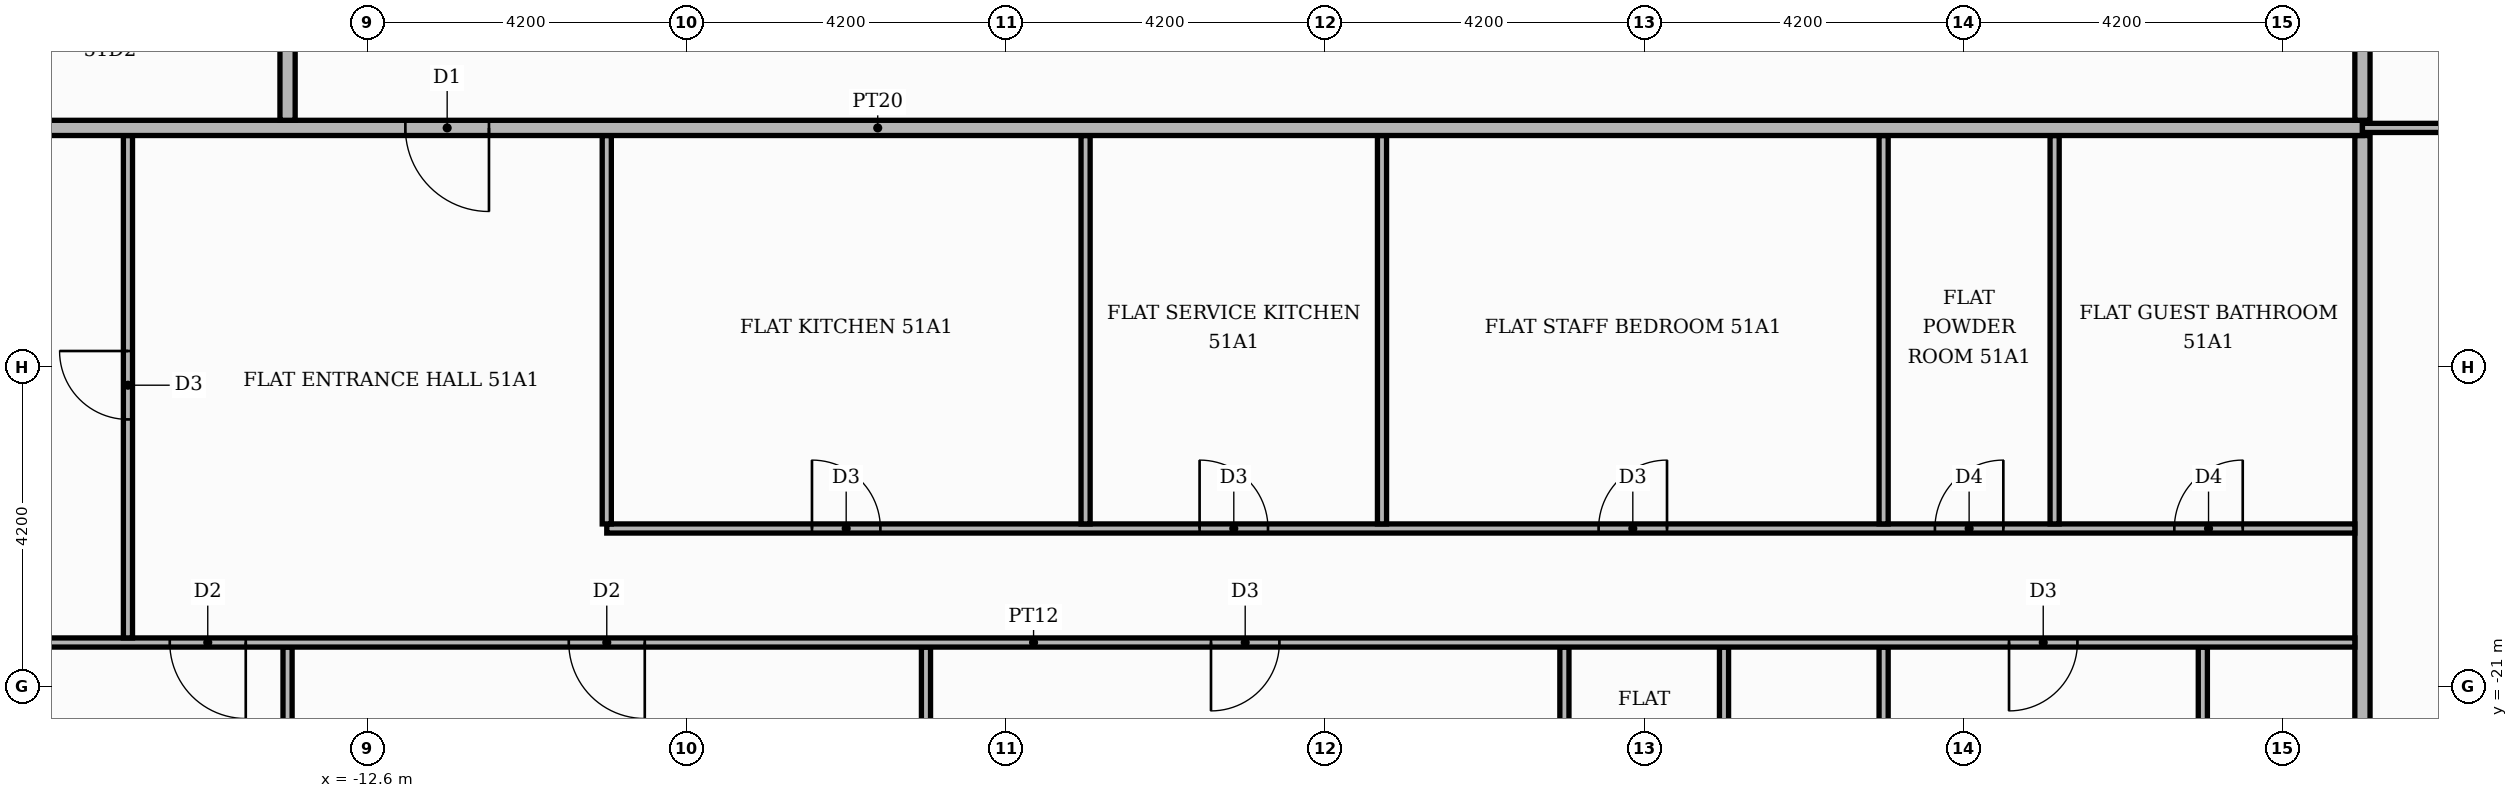
"""IFC4 building model, lengths in metres.
Left out: names, types, materials, properties, quantities, classifications, styles, units other than length and angle.
Written with IfcOpenShell. Run it as: python <this file> out.ifc"""

import sys

from ifc_helpers import new_model, si_unit, direction, frame, frame_2d, origin, place, context, subcontext, project, spatial, rectangle, extrude, element, fill, save


model = new_model("IFC4")
c1 = context("Model", 3, precision=1e-05, world=origin(), true_north=direction((0.0, 1.0)))
c2 = subcontext(c1, "Body", "Model", "MODEL_VIEW")
j1 = project(units=[si_unit("LENGTHUNIT", "METRE"), si_unit("PLANEANGLEUNIT", "RADIAN")], contexts=[c1])
p1 = place(None, origin())
s1 = spatial("IfcSite", under=j1, at=p1, CompositionType="ELEMENT")
p2 = place(p1, origin())
s2 = spatial("IfcBuilding", under=s1, at=p2, CompositionType="ELEMENT")
p3 = place(p2, frame((0.0, 0.0, 215.7)))
s3 = spatial("IfcBuildingStorey", under=s2, at=p3, CompositionType="ELEMENT", Elevation=215.7)
for number, where, z_axis, x_axis in (
    (1, (-13.65, -25.42, 0.0), (0.0, 0.0, 1.0), (0.0, 1.0, 0.0)),
    (2, (-5.25, -25.42, 0.0), (0.0, 0.0, 1.0), (0.0, 1.0, 0.0)),
):
    element("IfcWall", number, at=place(p3, frame(where, z_axis=z_axis, x_axis=x_axis)), inside=s3, PredefinedType="PARTITIONING", context=c2, shape_type="SweptSolid", body=[
        extrude(rectangle(XDim=4.94, YDim=0.12, at=frame_2d((2.47, 0.0))), origin(), (0.0, 0.0, 1.0), 3.48),
    ])
p4 = place(p3, frame((3.15, -25.42, 0.0), z_axis=(0.0, 0.0, 1.0), x_axis=(0.0, 1.0, 0.0)))
e3 = element("IfcWall", 3, at=p4, inside=s3, PredefinedType="PARTITIONING", context=c2, shape_type="SweptSolid", body=[
    extrude(rectangle(XDim=4.94, YDim=0.12, at=frame_2d((2.47, 0.0))), origin(), (0.0, 0.0, 1.0), 3.48),
])
p5 = place(p4, frame((1.9, 0.0, 0.0)))
e4 = element("IfcOpeningElement", 4, at=p5, cuts=e3, PredefinedType="OPENING", context=c2, shape_type="SweptSolid", body=[
    extrude(rectangle(XDim=0.9, YDim=2.1, at=frame_2d((0.45, 1.05))), frame((0.0, 0.07, 0.0), z_axis=(0.0, -1.0, 0.0), x_axis=(1.0, 0.0, 0.0)), (0.0, 0.0, 1.0), 0.14),
])
p6 = place(p3, frame((5.25, -25.42, 0.0), z_axis=(0.0, 0.0, 1.0), x_axis=(0.0, 1.0, 0.0)))
e5 = element("IfcWall", 5, at=p6, inside=s3, PredefinedType="PARTITIONING", context=c2, shape_type="SweptSolid", body=[
    extrude(rectangle(XDim=4.94, YDim=0.12, at=frame_2d((2.47, 0.0))), origin(), (0.0, 0.0, 1.0), 3.48),
])
p7 = place(p6, frame((1.9, 0.0, 0.0)))
e6 = element("IfcOpeningElement", 6, at=p7, cuts=e5, PredefinedType="OPENING", context=c2, shape_type="SweptSolid", body=[
    extrude(rectangle(XDim=0.9, YDim=2.1, at=frame_2d((0.45, 1.05))), frame((0.0, 0.07, 0.0), z_axis=(0.0, -1.0, 0.0), x_axis=(1.0, 0.0, 0.0)), (0.0, 0.0, 1.0), 0.14),
])
p8 = place(p3, frame((7.35, -25.42, 0.0), z_axis=(0.0, 0.0, 1.0), x_axis=(0.0, 1.0, 0.0)))
e7 = element("IfcWall", 7, at=p8, inside=s3, PredefinedType="PARTITIONING", context=c2, shape_type="SweptSolid", body=[
    extrude(rectangle(XDim=4.94, YDim=0.12, at=frame_2d((2.47, 0.0))), origin(), (0.0, 0.0, 1.0), 3.48),
])
p9 = place(p3, frame((11.55, -25.42, 0.0), z_axis=(0.0, 0.0, 1.0), x_axis=(0.0, 1.0, 0.0)))
e8 = element("IfcWall", 8, at=p9, inside=s3, PredefinedType="PARTITIONING", context=c2, shape_type="SweptSolid", body=[
    extrude(rectangle(XDim=4.94, YDim=0.12, at=frame_2d((2.47, 0.0))), origin(), (0.0, 0.0, 1.0), 3.48),
])
p10 = place(p9, frame((1.9, 0.0, 0.0)))
e9 = element("IfcOpeningElement", 9, at=p10, cuts=e8, PredefinedType="OPENING", context=c2, shape_type="SweptSolid", body=[
    extrude(rectangle(XDim=0.9, YDim=2.1, at=frame_2d((0.45, 1.05))), frame((0.0, 0.07, 0.0), z_axis=(0.0, -1.0, 0.0), x_axis=(1.0, 0.0, 0.0)), (0.0, 0.0, 1.0), 0.14),
])
p11 = place(p3, frame((13.65, -25.42, 0.0), z_axis=(0.0, 0.0, 1.0), x_axis=(0.0, 1.0, 0.0)))
e10 = element("IfcWall", 10, at=p11, inside=s3, PredefinedType="PARTITIONING", context=c2, shape_type="SweptSolid", body=[
    extrude(rectangle(XDim=11.67, YDim=0.2, at=frame_2d((5.835, 0.0))), origin(), (0.0, 0.0, 1.0), 3.48),
])
p12 = place(p3, frame((-21.219, -20.42, 0.0), z_axis=(0.0, 0.0, 1.0), x_axis=(1.0, 0.0, 0.0)))
e11 = element("IfcWall", 11, at=p12, inside=s3, PredefinedType="PARTITIONING", context=c2, shape_type="SweptSolid", body=[
    extrude(rectangle(XDim=34.769, YDim=0.12, at=frame_2d((17.385, 0.0))), origin(), (0.0, 0.0, 1.0), 3.48),
])
p13 = place(p12, frame((6.019, 0.0, 0.0)))
e12 = element("IfcOpeningElement", 12, at=p13, cuts=e11, PredefinedType="OPENING", context=c2, shape_type="SweptSolid", body=[
    extrude(rectangle(XDim=1.0, YDim=2.1, at=frame_2d((0.5, 1.05))), frame((0.0, 0.07, 0.0), z_axis=(0.0, -1.0, 0.0), x_axis=(1.0, 0.0, 0.0)), (0.0, 0.0, 1.0), 0.14),
])
p14 = place(p12, frame((11.269, 0.0, 0.0)))
e13 = element("IfcOpeningElement", 13, at=p14, cuts=e11, PredefinedType="OPENING", context=c2, shape_type="SweptSolid", body=[
    extrude(rectangle(XDim=1.0, YDim=2.1, at=frame_2d((0.5, 1.05))), frame((0.0, 0.07, 0.0), z_axis=(0.0, -1.0, 0.0), x_axis=(1.0, 0.0, 0.0)), (0.0, 0.0, 1.0), 0.14),
])
p15 = place(p12, frame((19.719, 0.0, 0.0)))
e14 = element("IfcOpeningElement", 14, at=p15, cuts=e11, PredefinedType="OPENING", context=c2, shape_type="SweptSolid", body=[
    extrude(rectangle(XDim=0.9, YDim=2.1, at=frame_2d((0.45, 1.05))), frame((0.0, 0.07, 0.0), z_axis=(0.0, -1.0, 0.0), x_axis=(1.0, 0.0, 0.0)), (0.0, 0.0, 1.0), 0.14),
])
p16 = place(p12, frame((30.219, 0.0, 0.0)))
e15 = element("IfcOpeningElement", 15, at=p16, cuts=e11, PredefinedType="OPENING", context=c2, shape_type="SweptSolid", body=[
    extrude(rectangle(XDim=0.9, YDim=2.1, at=frame_2d((0.45, 1.05))), frame((0.0, 0.07, 0.0), z_axis=(0.0, -1.0, 0.0), x_axis=(1.0, 0.0, 0.0)), (0.0, 0.0, 1.0), 0.14),
])
p17 = place(p3, frame((-15.75, -20.36, 0.0), z_axis=(0.0, 0.0, 1.0), x_axis=(0.0, 1.0, 0.0)))
e16 = element("IfcWall", 16, at=p17, inside=s3, PredefinedType="PARTITIONING", context=c2, shape_type="SweptSolid", body=[
    extrude(rectangle(XDim=6.61, YDim=0.12, at=frame_2d((3.305, 0.0))), origin(), (0.0, 0.0, 1.0), 3.48),
])
p18 = place(p17, frame((2.875, 0.0, 0.0)))
e17 = element("IfcOpeningElement", 17, at=p18, cuts=e16, PredefinedType="OPENING", context=c2, shape_type="SweptSolid", body=[
    extrude(rectangle(XDim=0.9, YDim=2.1, at=frame_2d((0.45, 1.05))), frame((0.0, 0.07, 0.0), z_axis=(0.0, -1.0, 0.0), x_axis=(1.0, 0.0, 0.0)), (0.0, 0.0, 1.0), 0.14),
])
p19 = place(p3, frame((-9.45, -18.92, 0.0), z_axis=(0.0, 0.0, 1.0), x_axis=(1.0, 0.0, 0.0)))
e18 = element("IfcWall", 18, at=p19, inside=s3, PredefinedType="PARTITIONING", context=c2, shape_type="SweptSolid", body=[
    extrude(rectangle(XDim=23.0, YDim=0.12, at=frame_2d((11.5, 0.0))), origin(), (0.0, 0.0, 1.0), 3.48),
])
p20 = place(p19, frame((2.7, 0.0, 0.0)))
e19 = element("IfcOpeningElement", 19, at=p20, cuts=e18, PredefinedType="OPENING", context=c2, shape_type="SweptSolid", body=[
    extrude(rectangle(XDim=0.9, YDim=2.1, at=frame_2d((0.45, 1.05))), frame((0.0, 0.07, 0.0), z_axis=(0.0, -1.0, 0.0), x_axis=(1.0, 0.0, 0.0)), (0.0, 0.0, 1.0), 0.14),
])
p21 = place(p19, frame((7.8, 0.0, 0.0)))
e20 = element("IfcOpeningElement", 20, at=p21, cuts=e18, PredefinedType="OPENING", context=c2, shape_type="SweptSolid", body=[
    extrude(rectangle(XDim=0.9, YDim=2.1, at=frame_2d((0.45, 1.05))), frame((0.0, 0.07, 0.0), z_axis=(0.0, -1.0, 0.0), x_axis=(1.0, 0.0, 0.0)), (0.0, 0.0, 1.0), 0.14),
])
p22 = place(p19, frame((13.05, 0.0, 0.0)))
e21 = element("IfcOpeningElement", 21, at=p22, cuts=e18, PredefinedType="OPENING", context=c2, shape_type="SweptSolid", body=[
    extrude(rectangle(XDim=0.9, YDim=2.1, at=frame_2d((0.45, 1.05))), frame((0.0, 0.07, 0.0), z_axis=(0.0, -1.0, 0.0), x_axis=(1.0, 0.0, 0.0)), (0.0, 0.0, 1.0), 0.14),
])
p23 = place(p19, frame((17.475, 0.0, 0.0)))
e22 = element("IfcOpeningElement", 22, at=p23, cuts=e18, PredefinedType="OPENING", context=c2, shape_type="SweptSolid", body=[
    extrude(rectangle(XDim=0.9, YDim=2.1, at=frame_2d((0.45, 1.05))), frame((0.0, 0.07, 0.0), z_axis=(0.0, -1.0, 0.0), x_axis=(1.0, 0.0, 0.0)), (0.0, 0.0, 1.0), 0.14),
])
p24 = place(p19, frame((20.625, 0.0, 0.0)))
e23 = element("IfcOpeningElement", 23, at=p24, cuts=e18, PredefinedType="OPENING", context=c2, shape_type="SweptSolid", body=[
    extrude(rectangle(XDim=0.9, YDim=2.1, at=frame_2d((0.45, 1.05))), frame((0.0, 0.07, 0.0), z_axis=(0.0, -1.0, 0.0), x_axis=(1.0, 0.0, 0.0)), (0.0, 0.0, 1.0), 0.14),
])
for number, where, z_axis, x_axis in (
    (24, (-9.45, -18.86, 0.0), (0.0, 0.0, 1.0), (0.0, 1.0, 0.0)),
    (25, (-3.15, -18.86, 0.0), (0.0, 0.0, 1.0), (0.0, 1.0, 0.0)),
    (26, (0.75, -18.86, 0.0), (0.0, 0.0, 1.0), (0.0, 1.0, 0.0)),
    (27, (7.35, -18.86, 0.0), (0.0, 0.0, 1.0), (0.0, 1.0, 0.0)),
    (28, (9.6, -18.86, 0.0), (0.0, 0.0, 1.0), (0.0, 1.0, 0.0)),
):
    element("IfcWall", number, at=place(p3, frame(where, z_axis=z_axis, x_axis=x_axis)), inside=s3, PredefinedType="PARTITIONING", context=c2, shape_type="SweptSolid", body=[
        extrude(rectangle(XDim=5.11, YDim=0.12, at=frame_2d((2.555, 0.0))), origin(), (0.0, 0.0, 1.0), 3.48),
    ])
p25 = place(p3, frame((-25.42, -13.65, 0.0), z_axis=(0.0, 0.0, 1.0), x_axis=(1.0, 0.0, 0.0)))
e29 = element("IfcWall", 29, at=p25, inside=s3, PredefinedType="PARTITIONING", context=c2, shape_type="SweptSolid", body=[
    extrude(rectangle(XDim=39.07, YDim=0.2, at=frame_2d((19.535, 0.0))), origin(), (0.0, 0.0, 1.0), 3.48),
])
p26 = place(p25, frame((13.32, 0.0, 0.0)))
e30 = element("IfcOpeningElement", 30, at=p26, cuts=e29, PredefinedType="OPENING", context=c2, shape_type="SweptSolid", body=[
    extrude(rectangle(XDim=1.1, YDim=2.4, at=frame_2d((0.55, 1.2))), frame((0.0, 0.11, 0.0), z_axis=(0.0, -1.0, 0.0), x_axis=(1.0, 0.0, 0.0)), (0.0, 0.0, 1.0), 0.22),
])
p27 = place(p3, frame((13.65, -13.65, 0.0), z_axis=(0.0, 0.0, 1.0), x_axis=(1.0, 0.0, 0.0)))
e31 = element("IfcWall", 31, at=p27, inside=s3, PredefinedType="PARTITIONING", context=c2, shape_type="SweptSolid", body=[
    extrude(rectangle(XDim=6.47, YDim=0.12, at=frame_2d((3.235, 0.0))), origin(), (0.0, 0.0, 1.0), 3.48),
])
p28 = place(p27, frame((2.785, 0.0, 0.0)))
e32 = element("IfcOpeningElement", 32, at=p28, cuts=e31, PredefinedType="OPENING", context=c2, shape_type="SweptSolid", body=[
    extrude(rectangle(XDim=0.9, YDim=2.1, at=frame_2d((0.45, 1.05))), frame((0.0, 0.07, 0.0), z_axis=(0.0, -1.0, 0.0), x_axis=(1.0, 0.0, 0.0)), (0.0, 0.0, 1.0), 0.14),
])
p29 = place(p3, frame((-13.65, -13.55, 0.0), z_axis=(0.0, 0.0, 1.0), x_axis=(0.0, 1.0, 0.0)))
e33 = element("IfcWall", 33, at=p29, inside=s3, PredefinedType="PARTITIONING", context=c2, shape_type="SweptSolid", body=[
    extrude(rectangle(XDim=18.7, YDim=0.2, at=frame_2d((9.35, 0.0))), origin(), (0.0, 0.0, 1.0), 3.48),
])
p30 = place(p29, frame((11.95, 0.0, 0.0)))
e34 = element("IfcOpeningElement", 34, at=p30, cuts=e33, PredefinedType="OPENING", context=c2, shape_type="SweptSolid", body=[
    extrude(rectangle(XDim=1.1, YDim=2.4, at=frame_2d((0.55, 1.2))), frame((0.0, 0.11, 0.0), z_axis=(0.0, -1.0, 0.0), x_axis=(1.0, 0.0, 0.0)), (0.0, 0.0, 1.0), 0.22),
])
p31 = place(p3, frame((13.65, -13.55, 0.0), z_axis=(0.0, 0.0, 1.0), x_axis=(0.0, 1.0, 0.0)))
e35 = element("IfcWall", 35, at=p31, inside=s3, PredefinedType="PARTITIONING", context=c2, shape_type="SweptSolid", body=[
    extrude(rectangle(XDim=2.45, YDim=0.2, at=frame_2d((1.225, 0.0))), origin(), (0.0, 0.0, 1.0), 3.48),
])
p32 = place(p26, frame((1.1, 0.0, 0.0), z_axis=(0.0, 0.0, 1.0), x_axis=(-1.0, 0.0, 0.0)))
e36 = element("IfcDoor", 36, at=p32, inside=s3, OperationType="SINGLE_SWING_RIGHT", PredefinedType="DOOR", context=c2, shape_type="SweptSolid", body=[
    extrude(rectangle(XDim=1.1, YDim=2.4, at=frame_2d((0.55, 1.2))), frame((0.0, 0.025, 0.0), z_axis=(0.0, -1.0, 0.0), x_axis=(1.0, 0.0, 0.0)), (0.0, 0.0, 1.0), 0.05),
])
fill(e30, e36)
p33 = place(p18, origin())
e37 = element("IfcDoor", 37, at=p33, inside=s3, OperationType="SINGLE_SWING_RIGHT", PredefinedType="DOOR", context=c2, shape_type="SweptSolid", body=[
    extrude(rectangle(XDim=0.9, YDim=2.1, at=frame_2d((0.45, 1.05))), frame((0.0, 0.025, 0.0), z_axis=(0.0, -1.0, 0.0), x_axis=(1.0, 0.0, 0.0)), (0.0, 0.0, 1.0), 0.05),
])
fill(e17, e37)
p34 = place(p20, origin())
e38 = element("IfcDoor", 38, at=p34, inside=s3, OperationType="SINGLE_SWING_LEFT", PredefinedType="DOOR", context=c2, shape_type="SweptSolid", body=[
    extrude(rectangle(XDim=0.9, YDim=2.1, at=frame_2d((0.45, 1.05))), frame((0.0, 0.025, 0.0), z_axis=(0.0, -1.0, 0.0), x_axis=(1.0, 0.0, 0.0)), (0.0, 0.0, 1.0), 0.05),
])
fill(e19, e38)
p35 = place(p21, origin())
e39 = element("IfcDoor", 39, at=p35, inside=s3, OperationType="SINGLE_SWING_LEFT", PredefinedType="DOOR", context=c2, shape_type="SweptSolid", body=[
    extrude(rectangle(XDim=0.9, YDim=2.1, at=frame_2d((0.45, 1.05))), frame((0.0, 0.025, 0.0), z_axis=(0.0, -1.0, 0.0), x_axis=(1.0, 0.0, 0.0)), (0.0, 0.0, 1.0), 0.05),
])
fill(e20, e39)
p36 = place(p22, origin())
e40 = element("IfcDoor", 40, at=p36, inside=s3, OperationType="SINGLE_SWING_RIGHT", PredefinedType="DOOR", context=c2, shape_type="SweptSolid", body=[
    extrude(rectangle(XDim=0.9, YDim=2.1, at=frame_2d((0.45, 1.05))), frame((0.0, 0.025, 0.0), z_axis=(0.0, -1.0, 0.0), x_axis=(1.0, 0.0, 0.0)), (0.0, 0.0, 1.0), 0.05),
])
fill(e21, e40)
p37 = place(p23, origin())
e41 = element("IfcDoor", 41, at=p37, inside=s3, OperationType="SINGLE_SWING_RIGHT", PredefinedType="DOOR", context=c2, shape_type="SweptSolid", body=[
    extrude(rectangle(XDim=0.9, YDim=2.1, at=frame_2d((0.45, 1.05))), frame((0.0, 0.025, 0.0), z_axis=(0.0, -1.0, 0.0), x_axis=(1.0, 0.0, 0.0)), (0.0, 0.0, 1.0), 0.05),
])
fill(e22, e41)
p38 = place(p24, origin())
e42 = element("IfcDoor", 42, at=p38, inside=s3, OperationType="SINGLE_SWING_RIGHT", PredefinedType="DOOR", context=c2, shape_type="SweptSolid", body=[
    extrude(rectangle(XDim=0.9, YDim=2.1, at=frame_2d((0.45, 1.05))), frame((0.0, 0.025, 0.0), z_axis=(0.0, -1.0, 0.0), x_axis=(1.0, 0.0, 0.0)), (0.0, 0.0, 1.0), 0.05),
])
fill(e23, e42)
p39 = place(p13, frame((1.0, 0.0, 0.0), z_axis=(0.0, 0.0, 1.0), x_axis=(-1.0, 0.0, 0.0)))
e43 = element("IfcDoor", 43, at=p39, inside=s3, OperationType="SINGLE_SWING_RIGHT", PredefinedType="DOOR", context=c2, shape_type="SweptSolid", body=[
    extrude(rectangle(XDim=1.0, YDim=2.1, at=frame_2d((0.5, 1.05))), frame((0.0, 0.025, 0.0), z_axis=(0.0, -1.0, 0.0), x_axis=(1.0, 0.0, 0.0)), (0.0, 0.0, 1.0), 0.05),
])
fill(e12, e43)
p40 = place(p14, frame((1.0, 0.0, 0.0), z_axis=(0.0, 0.0, 1.0), x_axis=(-1.0, 0.0, 0.0)))
e44 = element("IfcDoor", 44, at=p40, inside=s3, OperationType="SINGLE_SWING_RIGHT", PredefinedType="DOOR", context=c2, shape_type="SweptSolid", body=[
    extrude(rectangle(XDim=1.0, YDim=2.1, at=frame_2d((0.5, 1.05))), frame((0.0, 0.025, 0.0), z_axis=(0.0, -1.0, 0.0), x_axis=(1.0, 0.0, 0.0)), (0.0, 0.0, 1.0), 0.05),
])
fill(e13, e44)
p41 = place(p15, frame((0.9, 0.0, 0.0), z_axis=(0.0, 0.0, 1.0), x_axis=(-1.0, 0.0, 0.0)))
e45 = element("IfcDoor", 45, at=p41, inside=s3, OperationType="SINGLE_SWING_LEFT", PredefinedType="DOOR", context=c2, shape_type="SweptSolid", body=[
    extrude(rectangle(XDim=0.9, YDim=2.1, at=frame_2d((0.45, 1.05))), frame((0.0, 0.025, 0.0), z_axis=(0.0, -1.0, 0.0), x_axis=(1.0, 0.0, 0.0)), (0.0, 0.0, 1.0), 0.05),
])
fill(e14, e45)
p42 = place(p16, frame((0.9, 0.0, 0.0), z_axis=(0.0, 0.0, 1.0), x_axis=(-1.0, 0.0, 0.0)))
e46 = element("IfcDoor", 46, at=p42, inside=s3, OperationType="SINGLE_SWING_LEFT", PredefinedType="DOOR", context=c2, shape_type="SweptSolid", body=[
    extrude(rectangle(XDim=0.9, YDim=2.1, at=frame_2d((0.45, 1.05))), frame((0.0, 0.025, 0.0), z_axis=(0.0, -1.0, 0.0), x_axis=(1.0, 0.0, 0.0)), (0.0, 0.0, 1.0), 0.05),
])
fill(e15, e46)
save(model, sys.argv[1])
